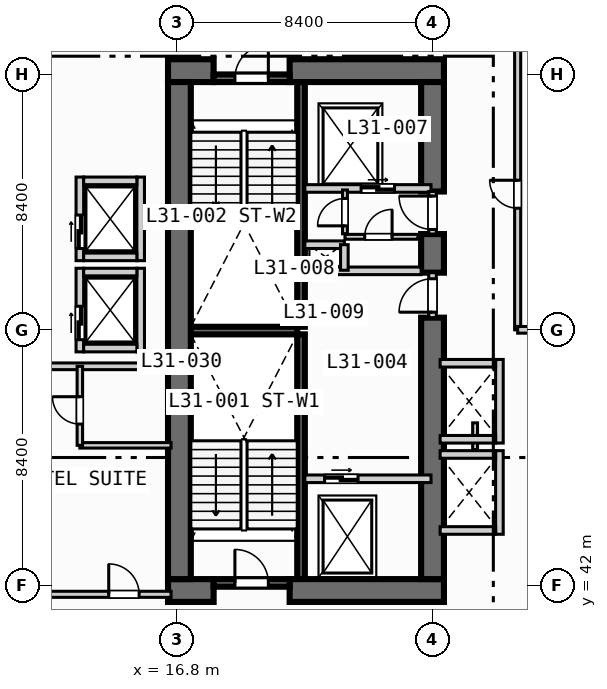
"""IFC4 building model, lengths in metres.
Left out: names, types, materials, properties, quantities, classifications, styles, units other than length and angle.
Written with IfcOpenShell. Run it as: python <this file> out.ifc"""

import sys

from ifc_helpers import new_model, si_unit, direction, frame, frame_2d, origin, place, context, subcontext, project, spatial, rectangle, extrude, element, fill, save


model = new_model("IFC4")
c1 = context("Model", 3, precision=1e-05, world=origin(), true_north=direction((0.0, 1.0)))
c2 = subcontext(c1, "Body", "Model", "MODEL_VIEW")
j1 = project(units=[si_unit("LENGTHUNIT", "METRE"), si_unit("PLANEANGLEUNIT", "RADIAN")], contexts=[c1])
p1 = place(None, origin())
s1 = spatial("IfcSite", under=j1, at=p1, CompositionType="ELEMENT")
p2 = place(p1, origin())
s2 = spatial("IfcBuilding", under=s1, at=p2, CompositionType="ELEMENT")
p3 = place(p2, frame((0.0, 0.0, 130.4)))
s3 = spatial("IfcBuildingStorey", under=s2, at=p3, CompositionType="ELEMENT", Elevation=130.4)
for number, where, z_axis, x_axis in (
    (1, (20.875, 42.2, 0.0), (0.0, 0.0, 1.0), (0.0, 1.0, 0.0)),
    (2, (20.875, 50.5, 0.0), (0.0, 0.0, 1.0), (0.0, 1.0, 0.0)),
):
    element("IfcWall", number, at=place(p3, frame(where, z_axis=z_axis, x_axis=x_axis)), inside=s3, PredefinedType="SOLIDWALL", context=c2, shape_type="SweptSolid", body=[
        extrude(rectangle(XDim=8.05, YDim=0.25, at=frame_2d((4.025, 0.0))), origin(), (0.0, 0.0, 1.0), 3.55),
    ])
p4 = place(p3, frame((17.25, 50.375, 0.0), z_axis=(0.0, 0.0, 1.0), x_axis=(1.0, 0.0, 0.0)))
e3 = element("IfcWall", 3, at=p4, inside=s3, PredefinedType="SOLIDWALL", context=c2, shape_type="SweptSolid", body=[
    extrude(rectangle(XDim=3.5, YDim=0.25, at=frame_2d((1.75, 0.0))), origin(), (0.0, 0.0, 1.0), 3.55),
])
p5 = place(p3, frame((16.5, 41.825, 0.0), z_axis=(0.0, 0.0, 1.0), x_axis=(1.0, 0.0, 0.0)))
e4 = element("IfcWall", 4, at=p5, inside=s3, PredefinedType="SHEAR", context=c2, shape_type="SweptSolid", body=[
    extrude(rectangle(XDim=1.5, YDim=0.75, at=frame_2d((0.75, 0.0))), origin(), (0.0, 0.0, 1.0), 3.55),
])
p6 = place(p3, frame((20.5, 41.825, 0.0), z_axis=(0.0, 0.0, 1.0), x_axis=(1.0, 0.0, 0.0)))
e5 = element("IfcWall", 5, at=p6, inside=s3, PredefinedType="SHEAR", context=c2, shape_type="SweptSolid", body=[
    extrude(rectangle(XDim=5.075, YDim=0.75, at=frame_2d((2.538, 0.0))), origin(), (0.0, 0.0, 1.0), 3.55),
])
p7 = place(p3, frame((16.5, 58.925, 0.0), z_axis=(0.0, 0.0, 1.0), x_axis=(1.0, 0.0, 0.0)))
e6 = element("IfcWall", 6, at=p7, inside=s3, PredefinedType="SHEAR", context=c2, shape_type="SweptSolid", body=[
    extrude(rectangle(XDim=1.5, YDim=0.75, at=frame_2d((0.75, 0.0))), origin(), (0.0, 0.0, 1.0), 3.55),
])
p8 = place(p3, frame((20.5, 58.925, 0.0), z_axis=(0.0, 0.0, 1.0), x_axis=(1.0, 0.0, 0.0)))
e7 = element("IfcWall", 7, at=p8, inside=s3, PredefinedType="SHEAR", context=c2, shape_type="SweptSolid", body=[
    extrude(rectangle(XDim=5.075, YDim=0.75, at=frame_2d((2.538, 0.0))), origin(), (0.0, 0.0, 1.0), 3.55),
])
p9 = place(p3, frame((16.875, 42.2, 0.0), z_axis=(0.0, 0.0, 1.0), x_axis=(0.0, 1.0, 0.0)))
e8 = element("IfcWall", 8, at=p9, inside=s3, PredefinedType="SHEAR", context=c2, shape_type="SweptSolid", body=[
    extrude(rectangle(XDim=16.35, YDim=0.75, at=frame_2d((8.175, 0.0))), origin(), (0.0, 0.0, 1.0), 3.55),
])
p10 = place(p3, frame((25.2, 42.2, 0.0), z_axis=(0.0, 0.0, 1.0), x_axis=(0.0, 1.0, 0.0)))
e9 = element("IfcWall", 9, at=p10, inside=s3, PredefinedType="SHEAR", context=c2, shape_type="SweptSolid", body=[
    extrude(rectangle(XDim=8.6, YDim=0.75, at=frame_2d((4.3, 0.0))), origin(), (0.0, 0.0, 1.0), 3.55),
])
p11 = place(p3, frame((25.2, 52.28, 0.0), z_axis=(0.0, 0.0, 1.0), x_axis=(0.0, 1.0, 0.0)))
e10 = element("IfcWall", 10, at=p11, inside=s3, PredefinedType="SHEAR", context=c2, shape_type="SweptSolid", body=[
    extrude(rectangle(XDim=1.27, YDim=0.75, at=frame_2d((0.635, 0.0))), origin(), (0.0, 0.0, 1.0), 3.55),
])
p12 = place(p3, frame((25.2, 54.95, 0.0), z_axis=(0.0, 0.0, 1.0), x_axis=(0.0, 1.0, 0.0)))
e11 = element("IfcWall", 11, at=p12, inside=s3, PredefinedType="SHEAR", context=c2, shape_type="SweptSolid", body=[
    extrude(rectangle(XDim=3.6, YDim=0.75, at=frame_2d((1.8, 0.0))), origin(), (0.0, 0.0, 1.0), 3.55),
])
p13 = place(p3, frame((18.0, 42.075, 0.0), z_axis=(0.0, 0.0, 1.0), x_axis=(1.0, 0.0, 0.0)))
e12 = element("IfcWall", 12, at=p13, inside=s3, PredefinedType="SOLIDWALL", context=c2, shape_type="SweptSolid", body=[
    extrude(rectangle(XDim=2.5, YDim=0.25, at=frame_2d((1.25, 0.0))), origin(), (0.0, 0.0, 1.0), 3.55),
])
p14 = place(p13, frame((0.7, 0.0, 0.0)))
e13 = element("IfcOpeningElement", 13, at=p14, cuts=e12, PredefinedType="OPENING", context=c2, shape_type="SweptSolid", body=[
    extrude(rectangle(XDim=1.1, YDim=2.15, at=frame_2d((0.55, 1.075))), frame((0.0, 0.135, 0.0), z_axis=(0.0, -1.0, 0.0), x_axis=(1.0, 0.0, 0.0)), (0.0, 0.0, 1.0), 0.27),
])
p15 = place(p3, frame((18.0, 58.675, 0.0), z_axis=(0.0, 0.0, 1.0), x_axis=(1.0, 0.0, 0.0)))
e14 = element("IfcWall", 14, at=p15, inside=s3, PredefinedType="SOLIDWALL", context=c2, shape_type="SweptSolid", body=[
    extrude(rectangle(XDim=2.5, YDim=0.25, at=frame_2d((1.25, 0.0))), origin(), (0.0, 0.0, 1.0), 3.55),
])
p16 = place(p15, frame((0.7, 0.0, 0.0)))
e15 = element("IfcOpeningElement", 15, at=p16, cuts=e14, PredefinedType="OPENING", context=c2, shape_type="SweptSolid", body=[
    extrude(rectangle(XDim=1.1, YDim=2.15, at=frame_2d((0.55, 1.075))), frame((0.0, 0.135, 0.0), z_axis=(0.0, -1.0, 0.0), x_axis=(1.0, 0.0, 0.0)), (0.0, 0.0, 1.0), 0.27),
])
p17 = place(p3, frame((21.0, 45.5, 0.0), z_axis=(0.0, 0.0, 1.0), x_axis=(1.0, 0.0, 0.0)))
e16 = element("IfcWall", 16, at=p17, inside=s3, PredefinedType="SOLIDWALL", context=c2, shape_type="SweptSolid", body=[
    extrude(rectangle(XDim=4.15, YDim=0.25, at=frame_2d((2.075, 0.0))), origin(), (0.0, 0.0, 1.0), 3.55),
])
p18 = place(p17, frame((0.65, 0.0, 0.0)))
e17 = element("IfcOpeningElement", 17, at=p18, cuts=e16, PredefinedType="OPENING", context=c2, shape_type="SweptSolid", body=[
    extrude(rectangle(XDim=1.1, YDim=2.15, at=frame_2d((0.55, 1.075))), frame((0.0, 0.135, 0.0), z_axis=(0.0, -1.0, 0.0), x_axis=(1.0, 0.0, 0.0)), (0.0, 0.0, 1.0), 0.27),
])
p19 = place(p3, frame((25.2, 50.8, 0.0), z_axis=(0.0, 0.0, 1.0), x_axis=(0.0, 1.0, 0.0)))
e18 = element("IfcWall", 18, at=p19, inside=s3, PredefinedType="SOLIDWALL", context=c2, shape_type="SweptSolid", body=[
    extrude(rectangle(XDim=1.48, YDim=0.25, at=frame_2d((0.74, 0.0))), origin(), (0.0, 0.0, 1.0), 3.55),
])
p20 = place(p19, frame((0.18, 0.0, 0.0)))
e19 = element("IfcOpeningElement", 19, at=p20, cuts=e18, PredefinedType="OPENING", context=c2, shape_type="SweptSolid", body=[
    extrude(rectangle(XDim=1.1, YDim=2.15, at=frame_2d((0.55, 1.075))), frame((0.0, 0.135, 0.0), z_axis=(0.0, -1.0, 0.0), x_axis=(1.0, 0.0, 0.0)), (0.0, 0.0, 1.0), 0.27),
])
p21 = place(p3, frame((21.0, 52.34, 0.0), z_axis=(0.0, 0.0, 1.0), x_axis=(1.0, 0.0, 0.0)))
e20 = element("IfcWall", 20, at=p21, inside=s3, PredefinedType="SOLIDWALL", context=c2, shape_type="SweptSolid", body=[
    extrude(rectangle(XDim=3.825, YDim=0.25, at=frame_2d((1.913, 0.0))), origin(), (0.0, 0.0, 1.0), 3.55),
])
p22 = place(p3, frame((21.0, 55.05, 0.0), z_axis=(0.0, 0.0, 1.0), x_axis=(1.0, 0.0, 0.0)))
e21 = element("IfcWall", 21, at=p22, inside=s3, PredefinedType="SOLIDWALL", context=c2, shape_type="SweptSolid", body=[
    extrude(rectangle(XDim=4.15, YDim=0.25, at=frame_2d((2.075, 0.0))), origin(), (0.0, 0.0, 1.0), 3.55),
])
p23 = place(p22, frame((1.85, 0.0, 0.0)))
e22 = element("IfcOpeningElement", 22, at=p23, cuts=e21, PredefinedType="OPENING", context=c2, shape_type="SweptSolid", body=[
    extrude(rectangle(XDim=1.1, YDim=2.15, at=frame_2d((0.55, 1.075))), frame((0.0, 0.135, 0.0), z_axis=(0.0, -1.0, 0.0), x_axis=(1.0, 0.0, 0.0)), (0.0, 0.0, 1.0), 0.27),
])
p24 = place(p3, frame((25.2, 53.55, 0.0), z_axis=(0.0, 0.0, 1.0), x_axis=(0.0, 1.0, 0.0)))
e23 = element("IfcWall", 23, at=p24, inside=s3, PredefinedType="SOLIDWALL", context=c2, shape_type="SweptSolid", body=[
    extrude(rectangle(XDim=1.4, YDim=0.25, at=frame_2d((0.7, 0.0))), origin(), (0.0, 0.0, 1.0), 3.55),
])
p25 = place(p24, frame((0.15, 0.0, 0.0)))
e24 = element("IfcOpeningElement", 24, at=p25, cuts=e23, PredefinedType="OPENING", context=c2, shape_type="SweptSolid", body=[
    extrude(rectangle(XDim=1.1, YDim=2.15, at=frame_2d((0.55, 1.075))), frame((0.0, 0.135, 0.0), z_axis=(0.0, -1.0, 0.0), x_axis=(1.0, 0.0, 0.0)), (0.0, 0.0, 1.0), 0.27),
])
p26 = place(p3, frame((21.0, 53.2, 0.0), z_axis=(0.0, 0.0, 1.0), x_axis=(1.0, 0.0, 0.0)))
e25 = element("IfcWall", 25, at=p26, inside=s3, PredefinedType="SOLIDWALL", context=c2, shape_type="SweptSolid", body=[
    extrude(rectangle(XDim=1.3, YDim=0.25, at=frame_2d((0.65, 0.0))), origin(), (0.0, 0.0, 1.0), 3.55),
])
p27 = place(p3, frame((22.3, 52.36, 0.0), z_axis=(0.0, 0.0, 1.0), x_axis=(0.0, 1.0, 0.0)))
e26 = element("IfcWall", 26, at=p27, inside=s3, PredefinedType="SOLIDWALL", context=c2, shape_type="SweptSolid", body=[
    extrude(rectangle(XDim=0.84, YDim=0.25, at=frame_2d((0.42, 0.0))), origin(), (0.0, 0.0, 1.0), 3.55),
])
p28 = place(p3, frame((22.32, 53.56, 0.0), z_axis=(0.0, 0.0, 1.0), x_axis=(0.0, 1.0, 0.0)))
e27 = element("IfcWall", 27, at=p28, inside=s3, PredefinedType="PARTITIONING", context=c2, shape_type="SweptSolid", body=[
    extrude(rectangle(XDim=1.44, YDim=0.16, at=frame_2d((0.72, 0.0))), origin(), (0.0, 0.0, 1.0), 3.55),
])
p29 = place(p28, frame((0.26, 0.0, 0.0)))
e28 = element("IfcOpeningElement", 28, at=p29, cuts=e27, PredefinedType="OPENING", context=c2, shape_type="SweptSolid", body=[
    extrude(rectangle(XDim=0.9, YDim=2.1, at=frame_2d((0.45, 1.05))), frame((0.0, 0.09, 0.0), z_axis=(0.0, -1.0, 0.0), x_axis=(1.0, 0.0, 0.0)), (0.0, 0.0, 1.0), 0.18),
])
p30 = place(p3, frame((22.32, 53.46, 0.0), z_axis=(0.0, 0.0, 1.0), x_axis=(1.0, 0.0, 0.0)))
e29 = element("IfcWall", 29, at=p30, inside=s3, PredefinedType="PARTITIONING", context=c2, shape_type="SweptSolid", body=[
    extrude(rectangle(XDim=2.4, YDim=0.16, at=frame_2d((1.2, 0.0))), origin(), (0.0, 0.0, 1.0), 3.55),
])
p31 = place(p30, frame((0.65, 0.0, 0.0)))
e30 = element("IfcOpeningElement", 30, at=p31, cuts=e29, PredefinedType="OPENING", context=c2, shape_type="SweptSolid", body=[
    extrude(rectangle(XDim=0.9, YDim=2.1, at=frame_2d((0.45, 1.05))), frame((0.0, 0.09, 0.0), z_axis=(0.0, -1.0, 0.0), x_axis=(1.0, 0.0, 0.0)), (0.0, 0.0, 1.0), 0.18),
])
p32 = place(p3, frame((13.6, 49.675, 0.0), z_axis=(0.0, 0.0, 1.0), x_axis=(0.0, 1.0, 0.0)))
e31 = element("IfcWall", 31, at=p32, inside=s3, PredefinedType="SOLIDWALL", context=c2, shape_type="SweptSolid", body=[
    extrude(rectangle(XDim=2.75, YDim=0.25, at=frame_2d((1.375, 0.0))), origin(), (0.0, 0.0, 1.0), 3.55),
])
p33 = place(p32, frame((0.4, 0.0, 0.0)))
e32 = element("IfcOpeningElement", 32, at=p33, cuts=e31, PredefinedType="OPENING", context=c2, shape_type="SweptSolid", body=[
    extrude(rectangle(XDim=1.1, YDim=2.15, at=frame_2d((0.55, 1.075))), frame((0.0, 0.135, 0.0), z_axis=(0.0, -1.0, 0.0), x_axis=(1.0, 0.0, 0.0)), (0.0, 0.0, 1.0), 0.27),
])
p34 = place(p3, frame((15.6, 49.675, 0.0), z_axis=(0.0, 0.0, 1.0), x_axis=(0.0, 1.0, 0.0)))
e33 = element("IfcWall", 33, at=p34, inside=s3, PredefinedType="SOLIDWALL", context=c2, shape_type="SweptSolid", body=[
    extrude(rectangle(XDim=2.75, YDim=0.25, at=frame_2d((1.375, 0.0))), origin(), (0.0, 0.0, 1.0), 3.55),
])
for number, where, z_axis, x_axis in (
    (34, (13.725, 49.8, 0.0), (0.0, 0.0, 1.0), (1.0, 0.0, 0.0)),
    (35, (13.725, 52.3, 0.0), (0.0, 0.0, 1.0), (1.0, 0.0, 0.0)),
):
    element("IfcWall", number, at=place(p3, frame(where, z_axis=z_axis, x_axis=x_axis)), inside=s3, PredefinedType="SOLIDWALL", context=c2, shape_type="SweptSolid", body=[
        extrude(rectangle(XDim=1.75, YDim=0.25, at=frame_2d((0.875, 0.0))), origin(), (0.0, 0.0, 1.0), 3.55),
    ])
p35 = place(p3, frame((13.6, 52.675, 0.0), z_axis=(0.0, 0.0, 1.0), x_axis=(0.0, 1.0, 0.0)))
e36 = element("IfcWall", 36, at=p35, inside=s3, PredefinedType="SOLIDWALL", context=c2, shape_type="SweptSolid", body=[
    extrude(rectangle(XDim=2.75, YDim=0.25, at=frame_2d((1.375, 0.0))), origin(), (0.0, 0.0, 1.0), 3.55),
])
p36 = place(p35, frame((0.4, 0.0, 0.0)))
e37 = element("IfcOpeningElement", 37, at=p36, cuts=e36, PredefinedType="OPENING", context=c2, shape_type="SweptSolid", body=[
    extrude(rectangle(XDim=1.1, YDim=2.15, at=frame_2d((0.55, 1.075))), frame((0.0, 0.135, 0.0), z_axis=(0.0, -1.0, 0.0), x_axis=(1.0, 0.0, 0.0)), (0.0, 0.0, 1.0), 0.27),
])
p37 = place(p3, frame((15.6, 52.675, 0.0), z_axis=(0.0, 0.0, 1.0), x_axis=(0.0, 1.0, 0.0)))
e38 = element("IfcWall", 38, at=p37, inside=s3, PredefinedType="SOLIDWALL", context=c2, shape_type="SweptSolid", body=[
    extrude(rectangle(XDim=2.75, YDim=0.25, at=frame_2d((1.375, 0.0))), origin(), (0.0, 0.0, 1.0), 3.55),
])
for number, where, z_axis, x_axis in (
    (39, (13.725, 52.8, 0.0), (0.0, 0.0, 1.0), (1.0, 0.0, 0.0)),
    (40, (13.725, 55.3, 0.0), (0.0, 0.0, 1.0), (1.0, 0.0, 0.0)),
):
    element("IfcWall", number, at=place(p3, frame(where, z_axis=z_axis, x_axis=x_axis)), inside=s3, PredefinedType="SOLIDWALL", context=c2, shape_type="SweptSolid", body=[
        extrude(rectangle(XDim=1.75, YDim=0.25, at=frame_2d((0.875, 0.0))), origin(), (0.0, 0.0, 1.0), 3.55),
    ])
p38 = place(p3, frame((27.4, 43.675, 0.0), z_axis=(0.0, 0.0, 1.0), x_axis=(0.0, 1.0, 0.0)))
e41 = element("IfcWall", 41, at=p38, inside=s3, PredefinedType="SOLIDWALL", context=c2, shape_type="SweptSolid", body=[
    extrude(rectangle(XDim=2.75, YDim=0.25, at=frame_2d((1.375, 0.0))), origin(), (0.0, 0.0, 1.0), 3.55),
])
for number, where, z_axis, x_axis in (
    (42, (25.45, 43.8, 0.0), (0.0, 0.0, 1.0), (1.0, 0.0, 0.0)),
    (43, (25.45, 46.3, 0.0), (0.0, 0.0, 1.0), (1.0, 0.0, 0.0)),
):
    element("IfcWall", number, at=place(p3, frame(where, z_axis=z_axis, x_axis=x_axis)), inside=s3, PredefinedType="SOLIDWALL", context=c2, shape_type="SweptSolid", body=[
        extrude(rectangle(XDim=1.825, YDim=0.25, at=frame_2d((0.913, 0.0))), origin(), (0.0, 0.0, 1.0), 3.55),
    ])
p39 = place(p3, frame((26.6, 46.46, 0.0), z_axis=(0.0, 0.0, 1.0), x_axis=(0.0, 1.0, 0.0)))
e44 = element("IfcWall", 44, at=p39, inside=s3, PredefinedType="PARTITIONING", context=c2, shape_type="SweptSolid", body=[
    extrude(rectangle(XDim=0.88, YDim=0.16, at=frame_2d((0.44, 0.0))), origin(), (0.0, 0.0, 1.0), 3.55),
])
p40 = place(p3, frame((27.4, 46.675, 0.0), z_axis=(0.0, 0.0, 1.0), x_axis=(0.0, 1.0, 0.0)))
e45 = element("IfcWall", 45, at=p40, inside=s3, PredefinedType="SOLIDWALL", context=c2, shape_type="SweptSolid", body=[
    extrude(rectangle(XDim=2.75, YDim=0.25, at=frame_2d((1.375, 0.0))), origin(), (0.0, 0.0, 1.0), 3.55),
])
for number, where, z_axis, x_axis in (
    (46, (25.45, 46.8, 0.0), (0.0, 0.0, 1.0), (1.0, 0.0, 0.0)),
    (47, (25.45, 49.3, 0.0), (0.0, 0.0, 1.0), (1.0, 0.0, 0.0)),
):
    element("IfcWall", number, at=place(p3, frame(where, z_axis=z_axis, x_axis=x_axis)), inside=s3, PredefinedType="SOLIDWALL", context=c2, shape_type="SweptSolid", body=[
        extrude(rectangle(XDim=1.825, YDim=0.25, at=frame_2d((0.913, 0.0))), origin(), (0.0, 0.0, 1.0), 3.55),
    ])
p41 = place(p3, frame((0.35, 41.7, 0.0), z_axis=(0.0, 0.0, 1.0), x_axis=(1.0, 0.0, 0.0)))
e48 = element("IfcWall", 48, at=p41, inside=s3, PredefinedType="PARTITIONING", context=c2, shape_type="SweptSolid", body=[
    extrude(rectangle(XDim=16.25, YDim=0.2, at=frame_2d((8.125, 0.0))), origin(), (0.0, 0.0, 1.0), 2.8),
])
p42 = place(p41, frame((14.2, 0.0, 0.0)))
e49 = element("IfcOpeningElement", 49, at=p42, cuts=e48, PredefinedType="OPENING", context=c2, shape_type="SweptSolid", body=[
    extrude(rectangle(XDim=1.0, YDim=2.15, at=frame_2d((0.5, 1.075))), frame((0.0, 0.11, 0.0), z_axis=(0.0, -1.0, 0.0), x_axis=(1.0, 0.0, 0.0)), (0.0, 0.0, 1.0), 0.22),
])
p43 = place(p3, frame((0.35, 49.2, 0.0), z_axis=(0.0, 0.0, 1.0), x_axis=(1.0, 0.0, 0.0)))
e50 = element("IfcWall", 50, at=p43, inside=s3, PredefinedType="PARTITIONING", context=c2, shape_type="SweptSolid", body=[
    extrude(rectangle(XDim=16.25, YDim=0.22, at=frame_2d((8.125, 0.0))), origin(), (0.0, 0.0, 1.0), 3.55),
])
p44 = place(p3, frame((13.6, 46.6, 0.0), z_axis=(0.0, 0.0, 1.0), x_axis=(1.0, 0.0, 0.0)))
e51 = element("IfcWall", 51, at=p44, inside=s3, PredefinedType="PLUMBINGWALL", context=c2, shape_type="SweptSolid", body=[
    extrude(rectangle(XDim=3.0, YDim=0.18, at=frame_2d((1.5, 0.0))), origin(), (0.0, 0.0, 1.0), 3.55),
])
p45 = place(p3, frame((13.6, 46.6, 0.0), z_axis=(0.0, 0.0, 1.0), x_axis=(0.0, 1.0, 0.0)))
e52 = element("IfcWall", 52, at=p45, inside=s3, PredefinedType="PLUMBINGWALL", context=c2, shape_type="SweptSolid", body=[
    extrude(rectangle(XDim=2.6, YDim=0.18, at=frame_2d((1.3, 0.0))), origin(), (0.0, 0.0, 1.0), 3.55),
])
p46 = place(p45, frame((0.7, 0.0, 0.0)))
e53 = element("IfcOpeningElement", 53, at=p46, cuts=e52, PredefinedType="OPENING", context=c2, shape_type="SweptSolid", body=[
    extrude(rectangle(XDim=0.9, YDim=2.1, at=frame_2d((0.45, 1.05))), frame((0.0, 0.1, 0.0), z_axis=(0.0, -1.0, 0.0), x_axis=(1.0, 0.0, 0.0)), (0.0, 0.0, 1.0), 0.2),
])
p47 = place(p3, frame((28.0, 50.4, 0.0), z_axis=(0.0, 0.0, 1.0), x_axis=(0.0, 1.0, 0.0)))
e54 = element("IfcWall", 54, at=p47, inside=s3, PredefinedType="PARTITIONING", context=c2, shape_type="SweptSolid", body=[
    extrude(rectangle(XDim=38.6, YDim=0.2, at=frame_2d((19.3, 0.0))), origin(), (0.0, 0.0, 1.0), 3.55),
])
p48 = place(p47, frame((4.0, 0.0, 0.0)))
e55 = element("IfcOpeningElement", 55, at=p48, cuts=e54, PredefinedType="OPENING", context=c2, shape_type="SweptSolid", body=[
    extrude(rectangle(XDim=0.92, YDim=2.1, at=frame_2d((0.46, 1.05))), frame((0.0, 0.11, 0.0), z_axis=(0.0, -1.0, 0.0), x_axis=(1.0, 0.0, 0.0)), (0.0, 0.0, 1.0), 0.22),
])
p49 = place(p3, frame((28.0, 50.4, 0.0), z_axis=(0.0, 0.0, 1.0), x_axis=(1.0, 0.0, 0.0)))
e56 = element("IfcWall", 56, at=p49, inside=s3, PredefinedType="PARTITIONING", context=c2, shape_type="SweptSolid", body=[
    extrude(rectangle(XDim=5.3, YDim=0.22, at=frame_2d((2.65, 0.0))), origin(), (0.0, 0.0, 1.0), 2.8),
])
p50 = place(p14, origin())
e57 = element("IfcDoor", 57, at=p50, inside=s3, OperationType="SINGLE_SWING_LEFT", PredefinedType="DOOR", context=c2, shape_type="SweptSolid", body=[
    extrude(rectangle(XDim=1.1, YDim=2.15, at=frame_2d((0.55, 1.075))), frame((0.0, 0.025, 0.0), z_axis=(0.0, -1.0, 0.0), x_axis=(1.0, 0.0, 0.0)), (0.0, 0.0, 1.0), 0.05),
])
fill(e13, e57)
p51 = place(p16, origin())
e58 = element("IfcDoor", 58, at=p51, inside=s3, OperationType="SINGLE_SWING_RIGHT", PredefinedType="DOOR", context=c2, shape_type="SweptSolid", body=[
    extrude(rectangle(XDim=1.1, YDim=2.15, at=frame_2d((0.55, 1.075))), frame((0.0, 0.025, 0.0), z_axis=(0.0, -1.0, 0.0), x_axis=(1.0, 0.0, 0.0)), (0.0, 0.0, 1.0), 0.05),
])
fill(e15, e58)
p52 = place(p18, origin())
e59 = element("IfcDoor", 59, at=p52, inside=s3, OperationType="SLIDING_TO_LEFT", PredefinedType="DOOR", context=c2, shape_type="SweptSolid", body=[
    extrude(rectangle(XDim=1.1, YDim=2.15, at=frame_2d((0.55, 1.075))), frame((0.0, 0.025, 0.0), z_axis=(0.0, -1.0, 0.0), x_axis=(1.0, 0.0, 0.0)), (0.0, 0.0, 1.0), 0.05),
])
fill(e17, e59)
p53 = place(p20, origin())
e60 = element("IfcDoor", 60, at=p53, inside=s3, OperationType="SINGLE_SWING_LEFT", PredefinedType="DOOR", context=c2, shape_type="SweptSolid", body=[
    extrude(rectangle(XDim=1.1, YDim=2.15, at=frame_2d((0.55, 1.075))), frame((0.0, 0.025, 0.0), z_axis=(0.0, -1.0, 0.0), x_axis=(1.0, 0.0, 0.0)), (0.0, 0.0, 1.0), 0.05),
])
fill(e19, e60)
p54 = place(p23, origin())
e61 = element("IfcDoor", 61, at=p54, inside=s3, OperationType="SLIDING_TO_LEFT", PredefinedType="DOOR", context=c2, shape_type="SweptSolid", body=[
    extrude(rectangle(XDim=1.1, YDim=2.15, at=frame_2d((0.55, 1.075))), frame((0.0, 0.025, 0.0), z_axis=(0.0, -1.0, 0.0), x_axis=(1.0, 0.0, 0.0)), (0.0, 0.0, 1.0), 0.05),
])
fill(e22, e61)
p55 = place(p25, origin())
e62 = element("IfcDoor", 62, at=p55, inside=s3, OperationType="SINGLE_SWING_RIGHT", PredefinedType="DOOR", context=c2, shape_type="SweptSolid", body=[
    extrude(rectangle(XDim=1.1, YDim=2.15, at=frame_2d((0.55, 1.075))), frame((0.0, 0.025, 0.0), z_axis=(0.0, -1.0, 0.0), x_axis=(1.0, 0.0, 0.0)), (0.0, 0.0, 1.0), 0.05),
])
fill(e24, e62)
p56 = place(p29, origin())
e63 = element("IfcDoor", 63, at=p56, inside=s3, OperationType="SINGLE_SWING_LEFT", PredefinedType="DOOR", context=c2, shape_type="SweptSolid", body=[
    extrude(rectangle(XDim=0.9, YDim=2.1, at=frame_2d((0.45, 1.05))), frame((0.0, 0.025, 0.0), z_axis=(0.0, -1.0, 0.0), x_axis=(1.0, 0.0, 0.0)), (0.0, 0.0, 1.0), 0.05),
])
fill(e28, e63)
p57 = place(p31, origin())
e64 = element("IfcDoor", 64, at=p57, inside=s3, OperationType="SINGLE_SWING_RIGHT", PredefinedType="DOOR", context=c2, shape_type="SweptSolid", body=[
    extrude(rectangle(XDim=0.9, YDim=2.1, at=frame_2d((0.45, 1.05))), frame((0.0, 0.025, 0.0), z_axis=(0.0, -1.0, 0.0), x_axis=(1.0, 0.0, 0.0)), (0.0, 0.0, 1.0), 0.05),
])
fill(e30, e64)
p58 = place(p33, origin())
e65 = element("IfcDoor", 65, at=p58, inside=s3, OperationType="SLIDING_TO_LEFT", PredefinedType="DOOR", context=c2, shape_type="SweptSolid", body=[
    extrude(rectangle(XDim=1.1, YDim=2.15, at=frame_2d((0.55, 1.075))), frame((0.0, 0.025, 0.0), z_axis=(0.0, -1.0, 0.0), x_axis=(1.0, 0.0, 0.0)), (0.0, 0.0, 1.0), 0.05),
])
fill(e32, e65)
p59 = place(p36, origin())
e66 = element("IfcDoor", 66, at=p59, inside=s3, OperationType="SLIDING_TO_LEFT", PredefinedType="DOOR", context=c2, shape_type="SweptSolid", body=[
    extrude(rectangle(XDim=1.1, YDim=2.15, at=frame_2d((0.55, 1.075))), frame((0.0, 0.025, 0.0), z_axis=(0.0, -1.0, 0.0), x_axis=(1.0, 0.0, 0.0)), (0.0, 0.0, 1.0), 0.05),
])
fill(e37, e66)
p60 = place(p42, origin())
e67 = element("IfcDoor", 67, at=p60, inside=s3, OperationType="SINGLE_SWING_LEFT", PredefinedType="DOOR", context=c2, shape_type="SweptSolid", body=[
    extrude(rectangle(XDim=1.0, YDim=2.15, at=frame_2d((0.5, 1.075))), frame((0.0, 0.025, 0.0), z_axis=(0.0, -1.0, 0.0), x_axis=(1.0, 0.0, 0.0)), (0.0, 0.0, 1.0), 0.05),
])
fill(e49, e67)
p61 = place(p46, origin())
e68 = element("IfcDoor", 68, at=p61, inside=s3, OperationType="SINGLE_SWING_RIGHT", PredefinedType="DOOR", context=c2, shape_type="SweptSolid", body=[
    extrude(rectangle(XDim=0.9, YDim=2.1, at=frame_2d((0.45, 1.05))), frame((0.0, 0.025, 0.0), z_axis=(0.0, -1.0, 0.0), x_axis=(1.0, 0.0, 0.0)), (0.0, 0.0, 1.0), 0.05),
])
fill(e53, e68)
p62 = place(p48, origin())
e69 = element("IfcDoor", 69, at=p62, inside=s3, OperationType="SINGLE_SWING_RIGHT", PredefinedType="DOOR", context=c2, shape_type="SweptSolid", body=[
    extrude(rectangle(XDim=0.92, YDim=2.1, at=frame_2d((0.46, 1.05))), frame((0.0, 0.025, 0.0), z_axis=(0.0, -1.0, 0.0), x_axis=(1.0, 0.0, 0.0)), (0.0, 0.0, 1.0), 0.05),
])
fill(e55, e69)
save(model, sys.argv[1])
